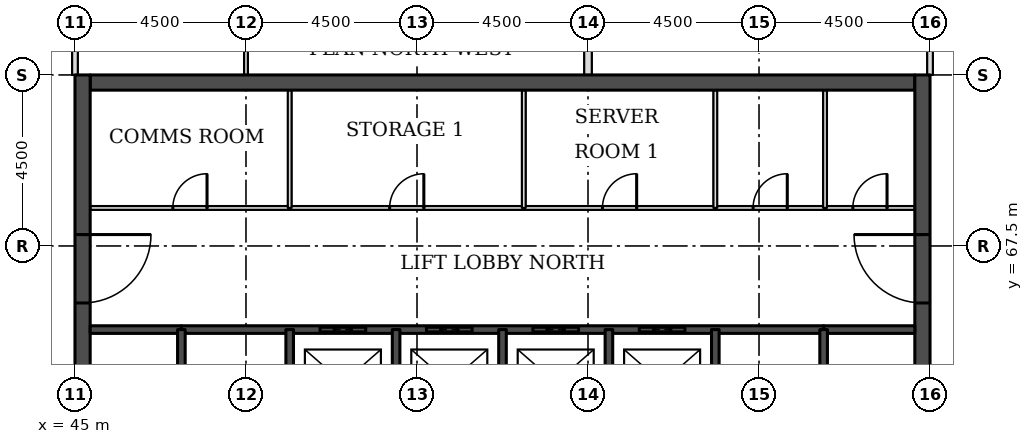
"""IFC4 building model, lengths in metres.
Left out: names, types, materials, properties, quantities, classifications, styles, units other than length and angle.
Written with IfcOpenShell. Run it as: python <this file> out.ifc"""

import sys

from ifc_helpers import new_model, si_unit, direction, frame, frame_2d, origin, place, context, subcontext, project, spatial, rectangle, extrude, element, fill, save


model = new_model("IFC4")
c1 = context("Model", 3, precision=1e-05, world=origin(), true_north=direction((0.0, 1.0)))
c2 = subcontext(c1, "Body", "Model", "MODEL_VIEW")
j1 = project(units=[si_unit("LENGTHUNIT", "METRE"), si_unit("PLANEANGLEUNIT", "RADIAN")], contexts=[c1])
p1 = place(None, origin())
s1 = spatial("IfcSite", under=j1, at=p1, CompositionType="ELEMENT")
p2 = place(p1, origin())
s2 = spatial("IfcBuilding", under=s1, at=p2, CompositionType="ELEMENT")
p3 = place(p2, frame((0.0, 0.0, 155.1)))
s3 = spatial("IfcBuildingStorey", under=s2, at=p3, CompositionType="ELEMENT", Elevation=155.1)
p4 = place(p3, frame((45.4, 71.8, 0.0), z_axis=(0.0, 0.0, 1.0), x_axis=(1.0, 0.0, 0.0)))
e1 = element("IfcWall", 1, at=p4, inside=s3, PredefinedType="SHEAR", context=c2, shape_type="SweptSolid", body=[
    extrude(rectangle(XDim=21.7, YDim=0.4, at=frame_2d((10.85, 0.0))), origin(), (0.0, 0.0, 1.0), 3.7),
])
p5 = place(p3, frame((45.2, 49.5, 0.0), z_axis=(0.0, 0.0, 1.0), x_axis=(0.0, 1.0, 0.0)))
e2 = element("IfcWall", 2, at=p5, inside=s3, PredefinedType="SHEAR", context=c2, shape_type="SweptSolid", body=[
    extrude(rectangle(XDim=22.5, YDim=0.4, at=frame_2d((11.25, 0.0))), origin(), (0.0, 0.0, 1.0), 3.7),
])
p6 = place(p5, frame((4.2, 0.0, 0.0)))
e3 = element("IfcOpeningElement", 3, at=p6, cuts=e2, PredefinedType="OPENING", context=c2, shape_type="SweptSolid", body=[
    extrude(rectangle(XDim=1.8, YDim=2.1, at=frame_2d((0.9, 1.05))), frame((0.0, 0.21, 0.0), z_axis=(0.0, -1.0, 0.0), x_axis=(1.0, 0.0, 0.0)), (0.0, 0.0, 1.0), 0.42),
])
p7 = place(p5, frame((6.9, 0.0, 0.0)))
e4 = element("IfcOpeningElement", 4, at=p7, cuts=e2, PredefinedType="OPENING", context=c2, shape_type="SweptSolid", body=[
    extrude(rectangle(XDim=1.1, YDim=2.1, at=frame_2d((0.55, 1.05))), frame((0.0, 0.21, 0.0), z_axis=(0.0, -1.0, 0.0), x_axis=(1.0, 0.0, 0.0)), (0.0, 0.0, 1.0), 0.42),
])
p8 = place(p5, frame((13.6, 0.0, 0.0)))
e5 = element("IfcOpeningElement", 5, at=p8, cuts=e2, PredefinedType="OPENING", context=c2, shape_type="SweptSolid", body=[
    extrude(rectangle(XDim=1.1, YDim=2.1, at=frame_2d((0.55, 1.05))), frame((0.0, 0.21, 0.0), z_axis=(0.0, -1.0, 0.0), x_axis=(1.0, 0.0, 0.0)), (0.0, 0.0, 1.0), 0.42),
])
p9 = place(p5, frame((16.5, 0.0, 0.0)))
e6 = element("IfcOpeningElement", 6, at=p9, cuts=e2, PredefinedType="OPENING", context=c2, shape_type="SweptSolid", body=[
    extrude(rectangle(XDim=1.8, YDim=2.1, at=frame_2d((0.9, 1.05))), frame((0.0, 0.21, 0.0), z_axis=(0.0, -1.0, 0.0), x_axis=(1.0, 0.0, 0.0)), (0.0, 0.0, 1.0), 0.42),
])
p10 = place(p3, frame((67.3, 49.5, 0.0), z_axis=(0.0, 0.0, 1.0), x_axis=(0.0, 1.0, 0.0)))
e7 = element("IfcWall", 7, at=p10, inside=s3, PredefinedType="SHEAR", context=c2, shape_type="SweptSolid", body=[
    extrude(rectangle(XDim=22.5, YDim=0.4, at=frame_2d((11.25, 0.0))), origin(), (0.0, 0.0, 1.0), 3.7),
])
p11 = place(p10, frame((4.2, 0.0, 0.0)))
e8 = element("IfcOpeningElement", 8, at=p11, cuts=e7, PredefinedType="OPENING", context=c2, shape_type="SweptSolid", body=[
    extrude(rectangle(XDim=1.8, YDim=2.1, at=frame_2d((0.9, 1.05))), frame((0.0, 0.21, 0.0), z_axis=(0.0, -1.0, 0.0), x_axis=(1.0, 0.0, 0.0)), (0.0, 0.0, 1.0), 0.42),
])
p12 = place(p10, frame((6.9, 0.0, 0.0)))
e9 = element("IfcOpeningElement", 9, at=p12, cuts=e7, PredefinedType="OPENING", context=c2, shape_type="SweptSolid", body=[
    extrude(rectangle(XDim=1.1, YDim=2.1, at=frame_2d((0.55, 1.05))), frame((0.0, 0.21, 0.0), z_axis=(0.0, -1.0, 0.0), x_axis=(1.0, 0.0, 0.0)), (0.0, 0.0, 1.0), 0.42),
])
p13 = place(p10, frame((13.6, 0.0, 0.0)))
e10 = element("IfcOpeningElement", 10, at=p13, cuts=e7, PredefinedType="OPENING", context=c2, shape_type="SweptSolid", body=[
    extrude(rectangle(XDim=1.1, YDim=2.1, at=frame_2d((0.55, 1.05))), frame((0.0, 0.21, 0.0), z_axis=(0.0, -1.0, 0.0), x_axis=(1.0, 0.0, 0.0)), (0.0, 0.0, 1.0), 0.42),
])
p14 = place(p10, frame((16.5, 0.0, 0.0)))
e11 = element("IfcOpeningElement", 11, at=p14, cuts=e7, PredefinedType="OPENING", context=c2, shape_type="SweptSolid", body=[
    extrude(rectangle(XDim=1.8, YDim=2.1, at=frame_2d((0.9, 1.05))), frame((0.0, 0.21, 0.0), z_axis=(0.0, -1.0, 0.0), x_axis=(1.0, 0.0, 0.0)), (0.0, 0.0, 1.0), 0.42),
])
p15 = place(p3, frame((45.0, 72.0, 0.0), z_axis=(0.0, 0.0, 1.0), x_axis=(0.0, 1.0, 0.0)))
e12 = element("IfcWall", 12, at=p15, inside=s3, PredefinedType="PARTITIONING", context=c2, shape_type="SweptSolid", body=[
    extrude(rectangle(XDim=3.0, YDim=0.15, at=frame_2d((1.5, 0.0))), origin(), (0.0, 0.0, 1.0), 3.022),
])
p16 = place(p3, frame((49.5, 72.0, 0.0), z_axis=(0.0, 0.0, 1.0), x_axis=(0.0, 1.0, 0.0)))
e13 = element("IfcWall", 13, at=p16, inside=s3, PredefinedType="PARTITIONING", context=c2, shape_type="SweptSolid", body=[
    extrude(rectangle(XDim=3.0, YDim=0.1, at=frame_2d((1.5, 0.0))), origin(), (0.0, 0.0, 1.0), 3.55),
])
p17 = place(p3, frame((58.5, 72.0, 0.0), z_axis=(0.0, 0.0, 1.0), x_axis=(0.0, 1.0, 0.0)))
e14 = element("IfcWall", 14, at=p17, inside=s3, PredefinedType="PARTITIONING", context=c2, shape_type="SweptSolid", body=[
    extrude(rectangle(XDim=3.0, YDim=0.2, at=frame_2d((1.5, 0.0))), origin(), (0.0, 0.0, 1.0), 3.55),
])
p18 = place(p3, frame((67.5, 72.0, 0.0), z_axis=(0.0, 0.0, 1.0), x_axis=(0.0, 1.0, 0.0)))
e15 = element("IfcWall", 15, at=p18, inside=s3, PredefinedType="PARTITIONING", context=c2, shape_type="SweptSolid", body=[
    extrude(rectangle(XDim=3.0, YDim=0.15, at=frame_2d((1.5, 0.0))), origin(), (0.0, 0.0, 1.0), 3.022),
])
for number, where, z_axis, x_axis in (
    (16, (45.4, 65.3, 0.0), (0.0, 0.0, 1.0), (1.0, 0.0, 0.0)),
    (17, (64.7, 65.3, 0.0), (0.0, 0.0, 1.0), (1.0, 0.0, 0.0)),
):
    element("IfcWall", number, at=place(p3, frame(where, z_axis=z_axis, x_axis=x_axis)), inside=s3, PredefinedType="SOLIDWALL", context=c2, shape_type="SweptSolid", body=[
        extrude(rectangle(XDim=2.4, YDim=0.2, at=frame_2d((1.2, 0.0))), origin(), (0.0, 0.0, 1.0), 3.55),
    ])
p19 = place(p3, frame((47.8, 65.3, 0.0), z_axis=(0.0, 0.0, 1.0), x_axis=(1.0, 0.0, 0.0)))
e18 = element("IfcWall", 18, at=p19, inside=s3, PredefinedType="SOLIDWALL", context=c2, shape_type="SweptSolid", body=[
    extrude(rectangle(XDim=16.9, YDim=0.2, at=frame_2d((8.45, 0.0))), origin(), (0.0, 0.0, 1.0), 3.55),
])
p20 = place(p19, frame((3.65, 0.0, 0.0)))
e19 = element("IfcOpeningElement", 19, at=p20, cuts=e18, PredefinedType="OPENING", context=c2, shape_type="SweptSolid", body=[
    extrude(rectangle(XDim=1.2, YDim=2.1, at=frame_2d((0.6, 1.05))), frame((0.0, 0.11, 0.0), z_axis=(0.0, -1.0, 0.0), x_axis=(1.0, 0.0, 0.0)), (0.0, 0.0, 1.0), 0.22),
])
p21 = place(p19, frame((6.45, 0.0, 0.0)))
e20 = element("IfcOpeningElement", 20, at=p21, cuts=e18, PredefinedType="OPENING", context=c2, shape_type="SweptSolid", body=[
    extrude(rectangle(XDim=1.2, YDim=2.1, at=frame_2d((0.6, 1.05))), frame((0.0, 0.11, 0.0), z_axis=(0.0, -1.0, 0.0), x_axis=(1.0, 0.0, 0.0)), (0.0, 0.0, 1.0), 0.22),
])
p22 = place(p19, frame((9.25, 0.0, 0.0)))
e21 = element("IfcOpeningElement", 21, at=p22, cuts=e18, PredefinedType="OPENING", context=c2, shape_type="SweptSolid", body=[
    extrude(rectangle(XDim=1.2, YDim=2.1, at=frame_2d((0.6, 1.05))), frame((0.0, 0.11, 0.0), z_axis=(0.0, -1.0, 0.0), x_axis=(1.0, 0.0, 0.0)), (0.0, 0.0, 1.0), 0.22),
])
p23 = place(p19, frame((12.05, 0.0, 0.0)))
e22 = element("IfcOpeningElement", 22, at=p23, cuts=e18, PredefinedType="OPENING", context=c2, shape_type="SweptSolid", body=[
    extrude(rectangle(XDim=1.2, YDim=2.1, at=frame_2d((0.6, 1.05))), frame((0.0, 0.11, 0.0), z_axis=(0.0, -1.0, 0.0), x_axis=(1.0, 0.0, 0.0)), (0.0, 0.0, 1.0), 0.22),
])
p24 = place(p3, frame((45.4, 68.5, 0.0), z_axis=(0.0, 0.0, 1.0), x_axis=(1.0, 0.0, 0.0)))
e23 = element("IfcWall", 23, at=p24, inside=s3, PredefinedType="PARTITIONING", context=c2, shape_type="SweptSolid", body=[
    extrude(rectangle(XDim=21.7, YDim=0.1, at=frame_2d((10.85, 0.0))), origin(), (0.0, 0.0, 1.0), 3.55),
])
p25 = place(p24, frame((20.069, 0.0, 0.0)))
e24 = element("IfcOpeningElement", 24, at=p25, cuts=e23, PredefinedType="OPENING", context=c2, shape_type="SweptSolid", body=[
    extrude(rectangle(XDim=0.9, YDim=2.1, at=frame_2d((0.45, 1.05))), frame((0.0, 0.06, 0.0), z_axis=(0.0, -1.0, 0.0), x_axis=(1.0, 0.0, 0.0)), (0.0, 0.0, 1.0), 0.12),
])
p26 = place(p24, frame((17.444, 0.0, 0.0)))
e25 = element("IfcOpeningElement", 25, at=p26, cuts=e23, PredefinedType="OPENING", context=c2, shape_type="SweptSolid", body=[
    extrude(rectangle(XDim=0.9, YDim=2.1, at=frame_2d((0.45, 1.05))), frame((0.0, 0.06, 0.0), z_axis=(0.0, -1.0, 0.0), x_axis=(1.0, 0.0, 0.0)), (0.0, 0.0, 1.0), 0.12),
])
p27 = place(p24, frame((2.175, 0.0, 0.0)))
e26 = element("IfcOpeningElement", 26, at=p27, cuts=e23, PredefinedType="OPENING", context=c2, shape_type="SweptSolid", body=[
    extrude(rectangle(XDim=0.9, YDim=2.1, at=frame_2d((0.45, 1.05))), frame((0.0, 0.06, 0.0), z_axis=(0.0, -1.0, 0.0), x_axis=(1.0, 0.0, 0.0)), (0.0, 0.0, 1.0), 0.12),
])
p28 = place(p24, frame((13.48, 0.0, 0.0)))
e27 = element("IfcOpeningElement", 27, at=p28, cuts=e23, PredefinedType="OPENING", context=c2, shape_type="SweptSolid", body=[
    extrude(rectangle(XDim=0.9, YDim=2.1, at=frame_2d((0.45, 1.05))), frame((0.0, 0.06, 0.0), z_axis=(0.0, -1.0, 0.0), x_axis=(1.0, 0.0, 0.0)), (0.0, 0.0, 1.0), 0.12),
])
p29 = place(p24, frame((7.88, 0.0, 0.0)))
e28 = element("IfcOpeningElement", 28, at=p29, cuts=e23, PredefinedType="OPENING", context=c2, shape_type="SweptSolid", body=[
    extrude(rectangle(XDim=0.9, YDim=2.1, at=frame_2d((0.45, 1.05))), frame((0.0, 0.06, 0.0), z_axis=(0.0, -1.0, 0.0), x_axis=(1.0, 0.0, 0.0)), (0.0, 0.0, 1.0), 0.12),
])
p30 = place(p3, frame((47.8, 62.0, 0.0), z_axis=(0.0, 0.0, 1.0), x_axis=(0.0, 1.0, 0.0)))
e29 = element("IfcWall", 29, at=p30, inside=s3, PredefinedType="SOLIDWALL", context=c2, shape_type="SweptSolid", body=[
    extrude(rectangle(XDim=3.3, YDim=0.2, at=frame_2d((1.65, 0.0))), origin(), (0.0, 0.0, 1.0), 3.55),
])
p31 = place(p30, frame((1.1, 0.0, 0.0)))
e30 = element("IfcOpeningElement", 30, at=p31, cuts=e29, PredefinedType="OPENING", context=c2, shape_type="SweptSolid", body=[
    extrude(rectangle(XDim=1.1, YDim=2.1, at=frame_2d((0.55, 1.05))), frame((0.0, 0.11, 0.0), z_axis=(0.0, -1.0, 0.0), x_axis=(1.0, 0.0, 0.0)), (0.0, 0.0, 1.0), 0.22),
])
p32 = place(p3, frame((50.65, 68.5, 0.0), z_axis=(0.0, 0.0, 1.0), x_axis=(0.0, 1.0, 0.0)))
e31 = element("IfcWall", 31, at=p32, inside=s3, PredefinedType="PARTITIONING", context=c2, shape_type="SweptSolid", body=[
    extrude(rectangle(XDim=3.1, YDim=0.1, at=frame_2d((1.55, 0.0))), origin(), (0.0, 0.0, 1.0), 3.55),
])
p33 = place(p3, frame((50.65, 62.0, 0.0), z_axis=(0.0, 0.0, 1.0), x_axis=(0.0, 1.0, 0.0)))
e32 = element("IfcWall", 32, at=p33, inside=s3, PredefinedType="SOLIDWALL", context=c2, shape_type="SweptSolid", body=[
    extrude(rectangle(XDim=3.3, YDim=0.2, at=frame_2d((1.65, 0.0))), origin(), (0.0, 0.0, 1.0), 3.55),
])
for number, where, z_axis, x_axis in (
    (33, (53.45, 62.5, 0.0), (0.0, 0.0, 1.0), (0.0, 1.0, 0.0)),
    (34, (56.25, 62.5, 0.0), (0.0, 0.0, 1.0), (0.0, 1.0, 0.0)),
):
    element("IfcWall", number, at=place(p3, frame(where, z_axis=z_axis, x_axis=x_axis)), inside=s3, PredefinedType="SOLIDWALL", context=c2, shape_type="SweptSolid", body=[
        extrude(rectangle(XDim=2.8, YDim=0.2, at=frame_2d((1.4, 0.0))), origin(), (0.0, 0.0, 1.0), 3.55),
    ])
p34 = place(p3, frame((56.81, 68.5, 0.0), z_axis=(0.0, 0.0, 1.0), x_axis=(0.0, 1.0, 0.0)))
e35 = element("IfcWall", 35, at=p34, inside=s3, PredefinedType="PARTITIONING", context=c2, shape_type="SweptSolid", body=[
    extrude(rectangle(XDim=3.1, YDim=0.1, at=frame_2d((1.55, 0.0))), origin(), (0.0, 0.0, 1.0), 3.55),
])
p35 = place(p3, frame((59.05, 62.5, 0.0), z_axis=(0.0, 0.0, 1.0), x_axis=(0.0, 1.0, 0.0)))
e36 = element("IfcWall", 36, at=p35, inside=s3, PredefinedType="SOLIDWALL", context=c2, shape_type="SweptSolid", body=[
    extrude(rectangle(XDim=2.8, YDim=0.2, at=frame_2d((1.4, 0.0))), origin(), (0.0, 0.0, 1.0), 3.55),
])
p36 = place(p3, frame((61.85, 68.5, 0.0), z_axis=(0.0, 0.0, 1.0), x_axis=(0.0, 1.0, 0.0)))
e37 = element("IfcWall", 37, at=p36, inside=s3, PredefinedType="PARTITIONING", context=c2, shape_type="SweptSolid", body=[
    extrude(rectangle(XDim=3.1, YDim=0.1, at=frame_2d((1.55, 0.0))), origin(), (0.0, 0.0, 1.0), 3.55),
])
p37 = place(p3, frame((61.85, 62.0, 0.0), z_axis=(0.0, 0.0, 1.0), x_axis=(0.0, 1.0, 0.0)))
e38 = element("IfcWall", 38, at=p37, inside=s3, PredefinedType="SOLIDWALL", context=c2, shape_type="SweptSolid", body=[
    extrude(rectangle(XDim=3.3, YDim=0.2, at=frame_2d((1.65, 0.0))), origin(), (0.0, 0.0, 1.0), 3.55),
])
p38 = place(p3, frame((64.7, 62.0, 0.0), z_axis=(0.0, 0.0, 1.0), x_axis=(0.0, 1.0, 0.0)))
e39 = element("IfcWall", 39, at=p38, inside=s3, PredefinedType="SOLIDWALL", context=c2, shape_type="SweptSolid", body=[
    extrude(rectangle(XDim=3.3, YDim=0.2, at=frame_2d((1.65, 0.0))), origin(), (0.0, 0.0, 1.0), 3.55),
])
p39 = place(p38, frame((1.1, 0.0, 0.0)))
e40 = element("IfcOpeningElement", 40, at=p39, cuts=e39, PredefinedType="OPENING", context=c2, shape_type="SweptSolid", body=[
    extrude(rectangle(XDim=1.1, YDim=2.1, at=frame_2d((0.55, 1.05))), frame((0.0, 0.11, 0.0), z_axis=(0.0, -1.0, 0.0), x_axis=(1.0, 0.0, 0.0)), (0.0, 0.0, 1.0), 0.22),
])
p40 = place(p3, frame((64.738, 68.5, 0.0), z_axis=(0.0, 0.0, 1.0), x_axis=(0.0, 1.0, 0.0)))
e41 = element("IfcWall", 41, at=p40, inside=s3, PredefinedType="PARTITIONING", context=c2, shape_type="SweptSolid", body=[
    extrude(rectangle(XDim=3.1, YDim=0.1, at=frame_2d((1.55, 0.0))), origin(), (0.0, 0.0, 1.0), 3.55),
])
p41 = place(p20, origin())
e42 = element("IfcDoor", 42, at=p41, inside=s3, OperationType="DOUBLE_DOOR_SLIDING", PredefinedType="DOOR", context=c2, shape_type="SweptSolid", body=[
    extrude(rectangle(XDim=1.2, YDim=2.1, at=frame_2d((0.6, 1.05))), frame((0.0, 0.025, 0.0), z_axis=(0.0, -1.0, 0.0), x_axis=(1.0, 0.0, 0.0)), (0.0, 0.0, 1.0), 0.05),
])
fill(e19, e42)
p42 = place(p21, origin())
e43 = element("IfcDoor", 43, at=p42, inside=s3, OperationType="DOUBLE_DOOR_SLIDING", PredefinedType="DOOR", context=c2, shape_type="SweptSolid", body=[
    extrude(rectangle(XDim=1.2, YDim=2.1, at=frame_2d((0.6, 1.05))), frame((0.0, 0.025, 0.0), z_axis=(0.0, -1.0, 0.0), x_axis=(1.0, 0.0, 0.0)), (0.0, 0.0, 1.0), 0.05),
])
fill(e20, e43)
p43 = place(p22, origin())
e44 = element("IfcDoor", 44, at=p43, inside=s3, OperationType="DOUBLE_DOOR_SLIDING", PredefinedType="DOOR", context=c2, shape_type="SweptSolid", body=[
    extrude(rectangle(XDim=1.2, YDim=2.1, at=frame_2d((0.6, 1.05))), frame((0.0, 0.025, 0.0), z_axis=(0.0, -1.0, 0.0), x_axis=(1.0, 0.0, 0.0)), (0.0, 0.0, 1.0), 0.05),
])
fill(e21, e44)
p44 = place(p23, origin())
e45 = element("IfcDoor", 45, at=p44, inside=s3, OperationType="DOUBLE_DOOR_SLIDING", PredefinedType="DOOR", context=c2, shape_type="SweptSolid", body=[
    extrude(rectangle(XDim=1.2, YDim=2.1, at=frame_2d((0.6, 1.05))), frame((0.0, 0.025, 0.0), z_axis=(0.0, -1.0, 0.0), x_axis=(1.0, 0.0, 0.0)), (0.0, 0.0, 1.0), 0.05),
])
fill(e22, e45)
p45 = place(p9, frame((1.8, 0.0, 0.0), z_axis=(0.0, 0.0, 1.0), x_axis=(-1.0, 0.0, 0.0)))
e46 = element("IfcDoor", 46, at=p45, inside=s3, OperationType="SINGLE_SWING_LEFT", PredefinedType="DOOR", context=c2, shape_type="SweptSolid", body=[
    extrude(rectangle(XDim=1.8, YDim=2.1, at=frame_2d((0.9, 1.05))), frame((0.0, 0.025, 0.0), z_axis=(0.0, -1.0, 0.0), x_axis=(1.0, 0.0, 0.0)), (0.0, 0.0, 1.0), 0.05),
])
fill(e6, e46)
p46 = place(p14, origin())
e47 = element("IfcDoor", 47, at=p46, inside=s3, OperationType="SINGLE_SWING_RIGHT", PredefinedType="DOOR", context=c2, shape_type="SweptSolid", body=[
    extrude(rectangle(XDim=1.8, YDim=2.1, at=frame_2d((0.9, 1.05))), frame((0.0, 0.025, 0.0), z_axis=(0.0, -1.0, 0.0), x_axis=(1.0, 0.0, 0.0)), (0.0, 0.0, 1.0), 0.05),
])
fill(e11, e47)
p47 = place(p25, origin())
e48 = element("IfcDoor", 48, at=p47, inside=s3, OperationType="SINGLE_SWING_RIGHT", PredefinedType="DOOR", context=c2, shape_type="SweptSolid", body=[
    extrude(rectangle(XDim=0.9, YDim=2.1, at=frame_2d((0.45, 1.05))), frame((0.0, 0.025, 0.0), z_axis=(0.0, -1.0, 0.0), x_axis=(1.0, 0.0, 0.0)), (0.0, 0.0, 1.0), 0.05),
])
fill(e24, e48)
p48 = place(p26, origin())
e49 = element("IfcDoor", 49, at=p48, inside=s3, OperationType="SINGLE_SWING_RIGHT", PredefinedType="DOOR", context=c2, shape_type="SweptSolid", body=[
    extrude(rectangle(XDim=0.9, YDim=2.1, at=frame_2d((0.45, 1.05))), frame((0.0, 0.025, 0.0), z_axis=(0.0, -1.0, 0.0), x_axis=(1.0, 0.0, 0.0)), (0.0, 0.0, 1.0), 0.05),
])
fill(e25, e49)
p49 = place(p27, origin())
e50 = element("IfcDoor", 50, at=p49, inside=s3, OperationType="SINGLE_SWING_RIGHT", PredefinedType="DOOR", context=c2, shape_type="SweptSolid", body=[
    extrude(rectangle(XDim=0.9, YDim=2.1, at=frame_2d((0.45, 1.05))), frame((0.0, 0.025, 0.0), z_axis=(0.0, -1.0, 0.0), x_axis=(1.0, 0.0, 0.0)), (0.0, 0.0, 1.0), 0.05),
])
fill(e26, e50)
p50 = place(p28, origin())
e51 = element("IfcDoor", 51, at=p50, inside=s3, OperationType="SINGLE_SWING_RIGHT", PredefinedType="DOOR", context=c2, shape_type="SweptSolid", body=[
    extrude(rectangle(XDim=0.9, YDim=2.1, at=frame_2d((0.45, 1.05))), frame((0.0, 0.025, 0.0), z_axis=(0.0, -1.0, 0.0), x_axis=(1.0, 0.0, 0.0)), (0.0, 0.0, 1.0), 0.05),
])
fill(e27, e51)
p51 = place(p29, origin())
e52 = element("IfcDoor", 52, at=p51, inside=s3, OperationType="SINGLE_SWING_RIGHT", PredefinedType="DOOR", context=c2, shape_type="SweptSolid", body=[
    extrude(rectangle(XDim=0.9, YDim=2.1, at=frame_2d((0.45, 1.05))), frame((0.0, 0.025, 0.0), z_axis=(0.0, -1.0, 0.0), x_axis=(1.0, 0.0, 0.0)), (0.0, 0.0, 1.0), 0.05),
])
fill(e28, e52)
save(model, sys.argv[1])
